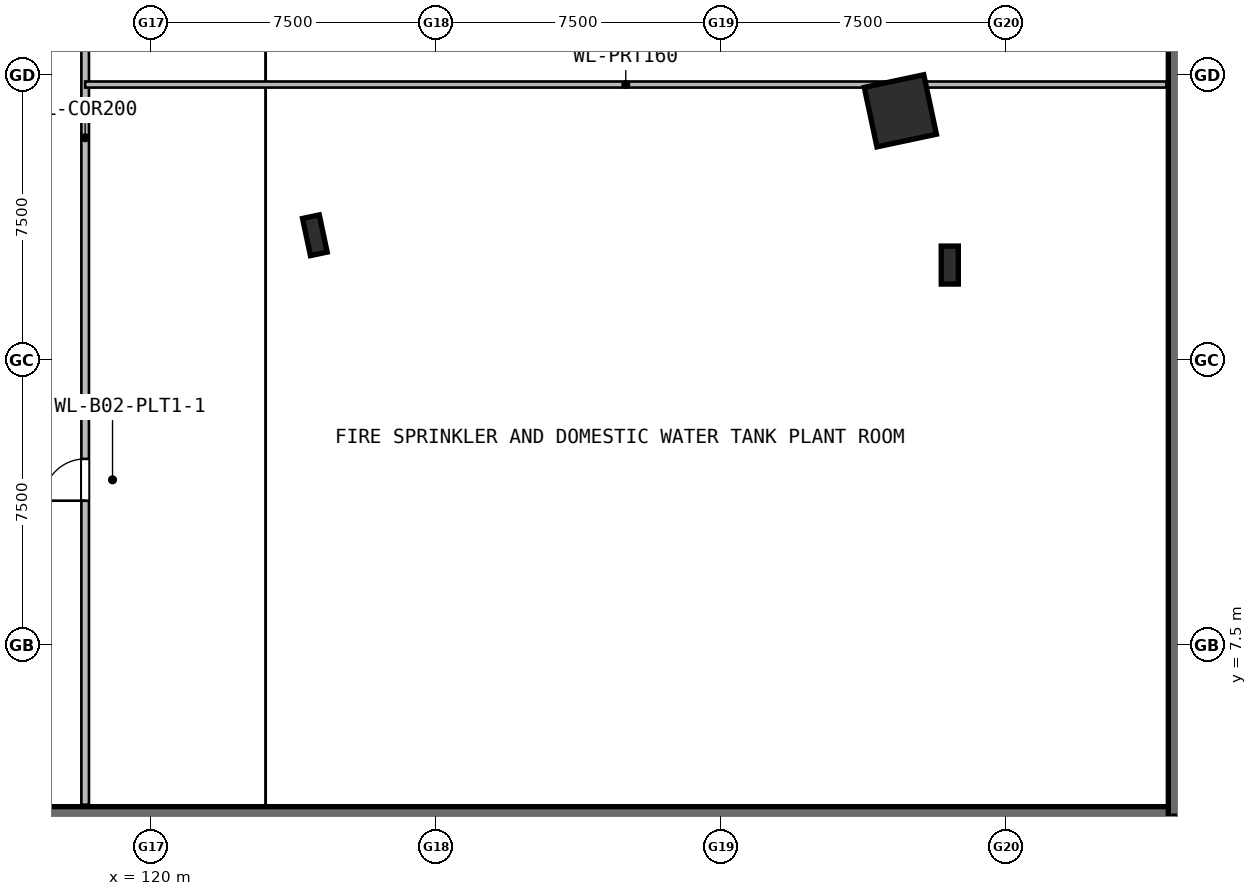
"""IFC4 building model, lengths in metres.
Left out: names, types, materials, properties, quantities, classifications, styles, units other than length and angle.
Written with IfcOpenShell. Run it as: python <this file> out.ifc"""

import sys

from ifc_helpers import new_model, si_unit, direction, frame, frame_2d, origin, origin_2d, place, context, subcontext, project, spatial, rectangle, hollow_rectangle, i_section, extrude, element, fill, save


model = new_model("IFC4")
c1 = context("Model", 3, precision=1e-05, world=origin(), true_north=direction((0.0, 1.0)))
c2 = subcontext(c1, "Body", "Model", "MODEL_VIEW")
j1 = project(units=[si_unit("LENGTHUNIT", "METRE"), si_unit("PLANEANGLEUNIT", "RADIAN")], contexts=[c1])
p1 = place(None, origin())
s1 = spatial("IfcSite", under=j1, at=p1, CompositionType="ELEMENT")
p2 = place(p1, origin())
s2 = spatial("IfcBuilding", under=s1, at=p2, CompositionType="ELEMENT")
p3 = place(p2, frame((0.0, 0.0, -10.8)))
s3 = spatial("IfcBuildingStorey", under=s2, at=p3, CompositionType="ELEMENT", Elevation=-10.8)
p4 = place(p3, frame((2.75, 3.0, 0.0), z_axis=(0.0, 0.0, 1.0), x_axis=(1.0, 0.0, 0.0)))
e1 = element("IfcWall", 1, at=p4, inside=s3, PredefinedType="SOLIDWALL", context=c2, shape_type="SweptSolid", body=[
    extrude(rectangle(XDim=144.5, YDim=0.5, at=frame_2d((72.25, 0.0))), origin(), (0.0, 0.0, 1.0), 5.4),
])
p5 = place(p3, frame((147.0, 3.0, 0.0), z_axis=(0.0, 0.0, 1.0), x_axis=(0.0, 1.0, 0.0)))
e2 = element("IfcWall", 2, at=p5, inside=s3, PredefinedType="SOLIDWALL", context=c2, shape_type="SweptSolid", body=[
    extrude(rectangle(XDim=54.0, YDim=0.5, at=frame_2d((27.0, 0.0))), origin(), (0.0, 0.0, 1.0), 5.4),
])
p6 = place(p3, frame((124.294, 18.284, 0.0), z_axis=(0.0, 0.0, 1.0), x_axis=(0.978147600734, 0.207911690818, 0.0)))
e3 = element("IfcColumn", 3, at=p6, inside=s3, PredefinedType="COLUMN", context=c2, shape_type="SweptSolid", body=[
    extrude(i_section(OverallWidth=0.45, OverallDepth=1.0, WebThickness=0.022, FlangeThickness=0.04, at=origin_2d()), origin(), (0.0, 0.0, 1.0), 5.4),
])
p7 = place(p3, frame((139.699, 21.559, 0.0), z_axis=(0.0, 0.0, 1.0), x_axis=(0.978147600734, 0.207911690818, 0.0)))
e4 = element("IfcColumn", 4, at=p7, inside=s3, PredefinedType="COLUMN", context=c2, shape_type="SweptSolid", body=[
    extrude(hollow_rectangle(XDim=1.6, YDim=1.6, WallThickness=0.04, at=origin_2d()), origin(), (0.0, 0.0, 1.0), 5.4),
])
p8 = place(p3, frame((141.0, 17.5, 0.0), z_axis=(0.0, 0.0, 1.0), x_axis=(1.0, 0.0, 0.0)))
e5 = element("IfcColumn", 5, at=p8, inside=s3, PredefinedType="COLUMN", context=c2, shape_type="SweptSolid", body=[
    extrude(i_section(OverallWidth=0.45, OverallDepth=1.0, WebThickness=0.022, FlangeThickness=0.04, at=origin_2d()), origin(), (0.0, 0.0, 1.0), 5.4),
])
p9 = place(p3, frame((118.25, 3.3, 0.0), z_axis=(0.0, 0.0, 1.0), x_axis=(0.0, 1.0, 0.0)))
e6 = element("IfcWall", 6, at=p9, inside=s3, PredefinedType="PARTITIONING", context=c2, shape_type="SweptSolid", body=[
    extrude(rectangle(XDim=34.9, YDim=0.2, at=frame_2d((17.45, 0.0))), origin(), (0.0, 0.0, 1.0), 5.08),
])
p10 = place(p9, frame((8.0, 0.0, 0.0)))
e7 = element("IfcOpeningElement", 7, at=p10, cuts=e6, PredefinedType="OPENING", context=c2, shape_type="SweptSolid", body=[
    extrude(rectangle(XDim=1.1, YDim=2.15, at=frame_2d((0.55, 1.075))), frame((0.0, 0.11, 0.0), z_axis=(0.0, -1.0, 0.0), x_axis=(1.0, 0.0, 0.0)), (0.0, 0.0, 1.0), 0.22),
])
p11 = place(p9, frame((26.0, 0.0, 0.0)))
e8 = element("IfcOpeningElement", 8, at=p11, cuts=e6, PredefinedType="OPENING", context=c2, shape_type="SweptSolid", body=[
    extrude(rectangle(XDim=1.1, YDim=2.15, at=frame_2d((0.55, 1.075))), frame((0.0, 0.11, 0.0), z_axis=(0.0, -1.0, 0.0), x_axis=(1.0, 0.0, 0.0)), (0.0, 0.0, 1.0), 0.22),
])
p12 = place(p3, frame((118.25, 22.25, 0.0), z_axis=(0.0, 0.0, 1.0), x_axis=(1.0, 0.0, 0.0)))
e9 = element("IfcWall", 9, at=p12, inside=s3, PredefinedType="PARTITIONING", context=c2, shape_type="SweptSolid", body=[
    extrude(rectangle(XDim=28.45, YDim=0.16, at=frame_2d((14.225, 0.0))), origin(), (0.0, 0.0, 1.0), 5.08),
])
p13 = place(p10, origin())
e10 = element("IfcDoor", 10, at=p13, inside=s3, OperationType="SINGLE_SWING_LEFT", PredefinedType="DOOR", context=c2, shape_type="SweptSolid", body=[
    extrude(rectangle(XDim=1.1, YDim=2.15, at=frame_2d((0.55, 1.075))), frame((0.0, 0.025, 0.0), z_axis=(0.0, -1.0, 0.0), x_axis=(1.0, 0.0, 0.0)), (0.0, 0.0, 1.0), 0.05),
])
fill(e7, e10)
save(model, sys.argv[1])
